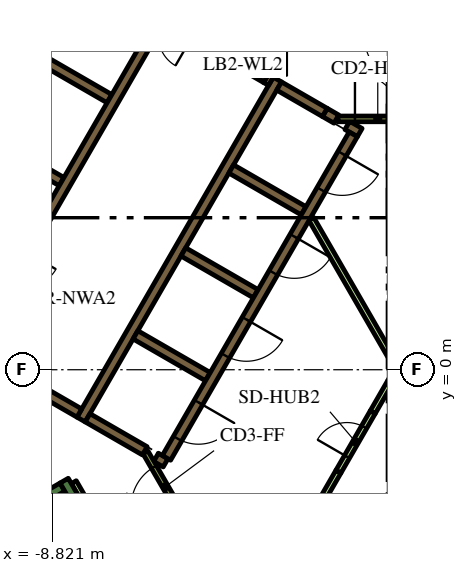
"""IFC4 building model, lengths in metres.
Left out: names, types, materials, properties, quantities, classifications, styles, units other than length and angle.
Written with IfcOpenShell. Run it as: python <this file> out.ifc"""

import sys

from ifc_helpers import new_model, si_unit, direction, frame, frame_2d, origin, place, context, subcontext, project, spatial, polyline, rectangle, outline, extrude, element, fill, save


model = new_model("IFC4")
c1 = context("Model", 3, precision=1e-05, world=origin(), true_north=direction((0.0, 1.0)))
c2 = subcontext(c1, "Body", "Model", "MODEL_VIEW")
j1 = project(units=[si_unit("LENGTHUNIT", "METRE"), si_unit("PLANEANGLEUNIT", "RADIAN")], contexts=[c1])
p1 = place(None, origin())
s1 = spatial("IfcSite", under=j1, at=p1, CompositionType="ELEMENT")
p2 = place(p1, origin())
s2 = spatial("IfcBuilding", under=s1, at=p2, CompositionType="ELEMENT")
p3 = place(p2, frame((0.0, 0.0, 118.8)))
s3 = spatial("IfcBuildingStorey", under=s2, at=p3, CompositionType="ELEMENT", Elevation=118.8)
p4 = place(p3, frame((-15.36, -1.503, 0.0), z_axis=(0.0, 0.0, 1.0), x_axis=(0.50000389221, 0.866023156604, 0.0)))
e1 = element("IfcWall", 1, at=p4, inside=s3, PredefinedType="SOLIDWALL", context=c2, shape_type="SweptSolid", body=[
    extrude(rectangle(XDim=21.0, YDim=0.9, at=frame_2d((10.5, 0.0))), origin(), (0.0, 0.0, 1.0), 3.9),
])
p5 = place(p3, frame((-14.44, -6.49, 0.0), z_axis=(0.0, 0.0, 1.0), x_axis=(0.866022966069, 0.500004222222, 0.0)))
e2 = element("IfcWall", 2, at=p5, inside=s3, PredefinedType="SOLIDWALL", context=c2, shape_type="SweptSolid", body=[
    extrude(rectangle(XDim=6.8, YDim=0.25, at=frame_2d((3.4, 0.0))), origin(), (0.0, 0.0, 1.0), 3.9),
])
p6 = place(p3, frame((-8.168, -3.503, 0.0), z_axis=(0.0, 0.0, 1.0), x_axis=(-0.499952099219, 0.866053057547, 0.0)))
e3 = element("IfcWall", 3, at=p6, inside=s3, PredefinedType="SOLIDWALL", context=c2, shape_type="SweptSolid", body=[
    extrude(rectangle(XDim=0.675, YDim=0.25, at=frame_2d((0.337, 0.0))), origin(), (0.0, 0.0, 1.0), 3.9),
])
p7 = place(p3, frame((-8.06, -1.311, 0.0), z_axis=(0.0, 0.0, 1.0), x_axis=(0.50000273126, 0.866023826885, 0.0)))
e4 = element("IfcWall", 4, at=p7, inside=s3, PredefinedType="SOLIDWALL", context=c2, shape_type="SweptSolid", body=[
    extrude(rectangle(XDim=10.33, YDim=0.25, at=frame_2d((5.165, 0.0))), origin(), (0.0, 0.0, 1.0), 3.9),
])
p8 = place(p3, frame((-1.342, 6.595, 0.0), z_axis=(0.0, 0.0, 1.0), x_axis=(-0.866046247233, 0.49996389635, 0.0)))
e5 = element("IfcWall", 5, at=p8, inside=s3, PredefinedType="SOLIDWALL", context=c2, shape_type="SweptSolid", body=[
    extrude(rectangle(XDim=0.35, YDim=0.25, at=frame_2d((0.175, 0.0))), origin(), (0.0, 0.0, 1.0), 3.9),
])
p9 = place(p3, frame((-1.647, 6.771, 0.0), z_axis=(0.0, 0.0, 1.0), x_axis=(-0.865971728693, 0.500092956464, 0.0)))
e6 = element("IfcWall", 6, at=p9, inside=s3, PredefinedType="SOLIDWALL", context=c2, shape_type="SweptSolid", body=[
    extrude(rectangle(XDim=1.388, YDim=0.25, at=frame_2d((0.694, 0.0))), origin(), (0.0, 0.0, 1.0), 3.9),
])
p10 = place(p3, frame((-0.728, 6.24, 0.0), z_axis=(0.0, 0.0, 1.0), x_axis=(-0.866088799389, 0.499890179513, 0.0)))
e7 = element("IfcWall", 7, at=p10, inside=s3, PredefinedType="SOLIDWALL", context=c2, shape_type="SweptSolid", body=[
    extrude(rectangle(XDim=0.378, YDim=0.25, at=frame_2d((0.189, 0.0))), origin(), (0.0, 0.0, 1.0), 3.9),
])
for number, where, z_axis, x_axis in (
    (8, (-2.204, 4.182, 0.0), (0.0, 0.0, 1.0), (-0.866, 0.5, 0.0)),
    (9, (-5.369, 3.1, 0.0), (0.0, 0.0, 1.0), (0.866, -0.5, 0.0)),
    (10, (-4.724, -0.182, 0.0), (0.0, 0.0, 1.0), (-0.866, 0.5, 0.0)),
):
    element("IfcWall", number, at=place(p3, frame(where, z_axis=z_axis, x_axis=x_axis)), inside=s3, PredefinedType="SOLIDWALL", context=c2, shape_type="SweptSolid", body=[
        extrude(rectangle(XDim=2.2, YDim=0.25, at=frame_2d((1.1, 0.0))), origin(), (0.0, 0.0, 1.0), 3.9),
    ])
p11 = place(p3, frame((-6.088, -2.305, 0.0), z_axis=(0.0, 0.0, 1.0), x_axis=(0.866059450854, -0.499941024108, 0.0)))
e11 = element("IfcWall", 11, at=p11, inside=s3, PredefinedType="SOLIDWALL", context=c2, shape_type="SweptSolid", body=[
    extrude(rectangle(XDim=0.29, YDim=0.25, at=frame_2d((0.145, 0.0))), origin(), (0.0, 0.0, 1.0), 3.9),
])
p12 = place(p3, frame((-7.889, -1.265, 0.0), z_axis=(0.0, 0.0, 1.0), x_axis=(0.865986741702, -0.500066958712, 0.0)))
e12 = element("IfcWall", 12, at=p12, inside=s3, PredefinedType="SOLIDWALL", context=c2, shape_type="SweptSolid", body=[
    extrude(rectangle(XDim=1.738, YDim=0.25, at=frame_2d((0.869, 0.0))), origin(), (0.0, 0.0, 1.0), 3.9),
])
p13 = place(p3, frame((-8.106, -1.14, 0.0), z_axis=(0.0, 0.0, 1.0), x_axis=(-0.866000643155, 0.500042884217, 0.0)))
e13 = element("IfcWall", 13, at=p13, inside=s3, PredefinedType="SOLIDWALL", context=c2, shape_type="SweptSolid", body=[
    extrude(rectangle(XDim=5.65, YDim=0.25, at=frame_2d((2.825, 0.0))), origin(), (0.0, 0.0, 1.0), 3.9),
])
p14 = place(p3, origin())
e14 = element("IfcWall", 14, at=p14, inside=s3, PredefinedType="SOLIDWALL", context=c2, shape_type="SweptSolid", body=[
    extrude(outline(polyline([(-3.128, 7.481), (-3.259, 7.557), (-3.134, 7.773), (-3.003, 7.698), (-3.128, 7.481)])), origin(), (0.0, 0.0, 1.0), 3.9),
])
for number, where, z_axis, x_axis in (
    (15, (-8.574, 4.95, 0.0), (0.0, 0.0, 1.0), (-0.866, 0.5, 0.0)),
    (16, (-7.314, 7.132, 0.0), (0.0, 0.0, 1.0), (-0.866, 0.5, 0.0)),
):
    element("IfcWall", number, at=place(p3, frame(where, z_axis=z_axis, x_axis=x_axis)), inside=s3, PredefinedType="SOLIDWALL", context=c2, shape_type="SweptSolid", body=[
        extrude(rectangle(XDim=2.2, YDim=0.25, at=frame_2d((1.1, 0.0))), origin(), (0.0, 0.0, 1.0), 3.9),
    ])
p15 = place(p3, frame((-4.409, 8.365, 0.0), z_axis=(0.0, 0.0, 1.0), x_axis=(-0.866057014183, 0.499945245186, 0.0)))
e17 = element("IfcWall", 17, at=p15, inside=s3, PredefinedType="SOLIDWALL", context=c2, shape_type="SweptSolid", body=[
    extrude(rectangle(XDim=0.379, YDim=0.25, at=frame_2d((0.19, 0.0))), origin(), (0.0, 0.0, 1.0), 3.9),
])
p16 = place(p3, frame((-1.887, -3.718, 0.0), z_axis=(0.0, 0.0, 1.0), x_axis=(0.500057179532, 0.865992388649, 0.0)))
e18 = element("IfcWall", 18, at=p16, inside=s3, PredefinedType="PARTITIONING", context=c2, shape_type="SweptSolid", body=[
    extrude(rectangle(XDim=1.199, YDim=0.15, at=frame_2d((0.6, 0.0))), origin(), (0.0, 0.0, 1.0), 2.75),
])
p17 = place(p3, frame((-8.252, -2.958, 0.0), z_axis=(0.0, 0.0, 1.0), x_axis=(0.500174715838, -0.865924508047, 0.0)))
e19 = element("IfcWall", 19, at=p17, inside=s3, PredefinedType="PARTITIONING", context=c2, shape_type="SweptSolid", body=[
    extrude(rectangle(XDim=0.514, YDim=0.15, at=frame_2d((0.257, 0.0))), origin(), (0.0, 0.0, 1.0), 2.75),
])
p18 = place(p3, frame((2.435, -3.718, 0.0), z_axis=(0.0, 0.0, 1.0), x_axis=(-0.499985176046, 0.866033962229, 0.0)))
e20 = element("IfcWall", 20, at=p18, inside=s3, PredefinedType="PARTITIONING", context=c2, shape_type="SweptSolid", body=[
    extrude(rectangle(XDim=8.875, YDim=0.15, at=frame_2d((4.438, 0.0))), origin(), (0.0, 0.0, 1.0), 2.75),
])
p19 = place(p3, frame((-0.387, -1.121, 0.0), z_axis=(0.0, 0.0, 1.0), x_axis=(0.500057179532, 0.865992388649, 0.0)))
e21 = element("IfcWall", 21, at=p19, inside=s3, PredefinedType="PARTITIONING", context=c2, shape_type="SweptSolid", body=[
    extrude(rectangle(XDim=1.199, YDim=0.15, at=frame_2d((0.6, 0.0))), origin(), (0.0, 0.0, 1.0), 2.75),
])
p20 = place(p3, frame((-6.008, 9.144, 0.0), z_axis=(0.0, 0.0, 1.0), x_axis=(-0.500006956611, -0.866021387346, 0.0)))
e22 = element("IfcWall", 22, at=p20, inside=s3, PredefinedType="SOLIDWALL", context=c2, shape_type="SweptSolid", body=[
    extrude(rectangle(XDim=9.83, YDim=0.25, at=frame_2d((4.915, 0.0))), origin(), (0.0, 0.0, 1.0), 3.9),
])
p21 = place(p20, frame((6.985, 0.0, 0.0)))
e23 = element("IfcOpeningElement", 23, at=p21, cuts=e22, PredefinedType="OPENING", context=c2, shape_type="SweptSolid", body=[
    extrude(rectangle(XDim=0.9, YDim=2.1, at=frame_2d((0.45, 1.05))), frame((0.0, 0.135, 0.0), z_axis=(0.0, -1.0, 0.0), x_axis=(1.0, 0.0, 0.0)), (0.0, 0.0, 1.0), 0.27),
])
p22 = place(p3, frame((-0.898, 6.194, 0.0), z_axis=(0.0, 0.0, 1.0), x_axis=(-0.499996202215, -0.866027596426, 0.0)))
e24 = element("IfcWall", 24, at=p22, inside=s3, PredefinedType="SOLIDWALL", context=c2, shape_type="SweptSolid", body=[
    extrude(rectangle(XDim=9.83, YDim=0.25, at=frame_2d((4.915, 0.0))), origin(), (0.0, 0.0, 1.0), 3.9),
])
p23 = place(p22, frame((0.585, 0.0, 0.0)))
e25 = element("IfcOpeningElement", 25, at=p23, cuts=e24, PredefinedType="OPENING", context=c2, shape_type="SweptSolid", body=[
    extrude(rectangle(XDim=1.1, YDim=2.1, at=frame_2d((0.55, 1.05))), frame((0.0, 0.135, 0.0), z_axis=(0.0, -1.0, 0.0), x_axis=(1.0, 0.0, 0.0)), (0.0, 0.0, 1.0), 0.27),
])
p24 = place(p22, frame((3.105, 0.0, 0.0)))
e26 = element("IfcOpeningElement", 26, at=p24, cuts=e24, PredefinedType="OPENING", context=c2, shape_type="SweptSolid", body=[
    extrude(rectangle(XDim=1.1, YDim=2.1, at=frame_2d((0.55, 1.05))), frame((0.0, 0.135, 0.0), z_axis=(0.0, -1.0, 0.0), x_axis=(1.0, 0.0, 0.0)), (0.0, 0.0, 1.0), 0.27),
])
p25 = place(p22, frame((5.625, 0.0, 0.0)))
e27 = element("IfcOpeningElement", 27, at=p25, cuts=e24, PredefinedType="OPENING", context=c2, shape_type="SweptSolid", body=[
    extrude(rectangle(XDim=1.1, YDim=2.1, at=frame_2d((0.55, 1.05))), frame((0.0, 0.135, 0.0), z_axis=(0.0, -1.0, 0.0), x_axis=(1.0, 0.0, 0.0)), (0.0, 0.0, 1.0), 0.27),
])
p26 = place(p22, frame((8.145, 0.0, 0.0)))
e28 = element("IfcOpeningElement", 28, at=p26, cuts=e24, PredefinedType="OPENING", context=c2, shape_type="SweptSolid", body=[
    extrude(rectangle(XDim=1.1, YDim=2.1, at=frame_2d((0.55, 1.05))), frame((0.0, 0.135, 0.0), z_axis=(0.0, -1.0, 0.0), x_axis=(1.0, 0.0, 0.0)), (0.0, 0.0, 1.0), 0.27),
])
p27 = place(p3, frame((-1.303, 6.6, 0.0), z_axis=(0.0, 0.0, 1.0), x_axis=(1.0, 0.0, 0.0)))
e29 = element("IfcWall", 29, at=p27, inside=s3, PredefinedType="PARTITIONING", context=c2, shape_type="SweptSolid", body=[
    extrude(rectangle(XDim=2.1, YDim=0.15, at=frame_2d((1.05, 0.0))), origin(), (0.0, 0.0, 1.0), 3.9),
])
p28 = place(p27, frame((0.45, 0.0, 0.0)))
e30 = element("IfcOpeningElement", 30, at=p28, cuts=e29, PredefinedType="OPENING", context=c2, shape_type="SweptSolid", body=[
    extrude(rectangle(XDim=1.2, YDim=2.1, at=frame_2d((0.6, 1.05))), frame((0.0, 0.085, 0.0), z_axis=(0.0, -1.0, 0.0), x_axis=(1.0, 0.0, 0.0)), (0.0, 0.0, 1.0), 0.17),
])
p29 = place(p3, frame((-5.317, -3.99, 0.0), z_axis=(0.0, 0.0, 1.0), x_axis=(-0.500027713859, 0.866009402589, 0.0)))
e31 = element("IfcWall", 31, at=p29, inside=s3, PredefinedType="PARTITIONING", context=c2, shape_type="SweptSolid", body=[
    extrude(rectangle(XDim=2.1, YDim=0.15, at=frame_2d((1.05, 0.0))), origin(), (0.0, 0.0, 1.0), 3.9),
])
p30 = place(p29, frame((0.45, 0.0, 0.0)))
e32 = element("IfcOpeningElement", 32, at=p30, cuts=e31, PredefinedType="OPENING", context=c2, shape_type="SweptSolid", body=[
    extrude(rectangle(XDim=1.2, YDim=2.1, at=frame_2d((0.6, 1.05))), frame((0.0, 0.085, 0.0), z_axis=(0.0, -1.0, 0.0), x_axis=(1.0, 0.0, 0.0)), (0.0, 0.0, 1.0), 0.17),
])
p31 = place(p3, frame((-4.409, 8.365, 0.0), z_axis=(0.0, 0.0, 1.0), x_axis=(0.866034573852, -0.49998411664, 0.0)))
e33 = element("IfcWall", 33, at=p31, inside=s3, PredefinedType="SOLIDWALL", context=c2, shape_type="SweptSolid", body=[
    extrude(rectangle(XDim=1.4, YDim=0.25, at=frame_2d((0.7, 0.0))), origin(), (0.0, 0.0, 1.0), 3.9),
])
p32 = place(p31, frame((0.1, 0.0, 0.0)))
e34 = element("IfcOpeningElement", 34, at=p32, cuts=e33, PredefinedType="OPENING", context=c2, shape_type="SweptSolid", body=[
    extrude(rectangle(XDim=1.2, YDim=2.1, at=frame_2d((0.6, 1.05))), frame((0.0, 0.135, 0.0), z_axis=(0.0, -1.0, 0.0), x_axis=(1.0, 0.0, 0.0)), (0.0, 0.0, 1.0), 0.27),
])
p33 = place(p3, frame((-1.287, -2.679, 0.0), z_axis=(0.0, 0.0, 1.0), x_axis=(0.499961193289, 0.866047807691, 0.0)))
e35 = element("IfcWall", 35, at=p33, inside=s3, PredefinedType="PARTITIONING", context=c2, shape_type="SweptSolid", body=[
    extrude(rectangle(XDim=1.8, YDim=0.15, at=frame_2d((0.9, 0.0))), origin(), (0.0, 0.0, 1.0), 2.75),
])
p34 = place(p33, frame((0.45, 0.0, 0.0)))
e36 = element("IfcOpeningElement", 36, at=p34, cuts=e35, PredefinedType="OPENING", context=c2, shape_type="SweptSolid", body=[
    extrude(rectangle(XDim=0.9, YDim=2.1, at=frame_2d((0.45, 1.05))), frame((0.0, 0.085, 0.0), z_axis=(0.0, -1.0, 0.0), x_axis=(1.0, 0.0, 0.0)), (0.0, 0.0, 1.0), 0.17),
])
p35 = place(p3, frame((-19.081, -3.9, 0.0), z_axis=(0.0, 0.0, 1.0), x_axis=(0.499998313975, 0.866026377209, 0.0)))
e37 = element("IfcWall", 37, at=p35, inside=s3, PredefinedType="PARTITIONING", context=c2, shape_type="SweptSolid", body=[
    extrude(rectangle(XDim=25.766, YDim=0.15, at=frame_2d((12.883, 0.0))), origin(), (0.0, 0.0, 1.0), 2.75),
])
p36 = place(p35, frame((19.306, 0.0, 0.0)))
e38 = element("IfcOpeningElement", 38, at=p36, cuts=e37, PredefinedType="OPENING", context=c2, shape_type="SweptSolid", body=[
    extrude(rectangle(XDim=1.0, YDim=2.1, at=frame_2d((0.5, 1.05))), frame((0.0, 0.085, 0.0), z_axis=(0.0, -1.0, 0.0), x_axis=(1.0, 0.0, 0.0)), (0.0, 0.0, 1.0), 0.17),
])
p37 = place(p35, frame((18.0, 0.0, 0.0)))
e39 = element("IfcOpeningElement", 39, at=p37, cuts=e37, PredefinedType="OPENING", context=c2, shape_type="SweptSolid", body=[
    extrude(rectangle(XDim=1.0, YDim=2.1, at=frame_2d((0.5, 1.05))), frame((0.0, 0.085, 0.0), z_axis=(0.0, -1.0, 0.0), x_axis=(1.0, 0.0, 0.0)), (0.0, 0.0, 1.0), 0.17),
])
p38 = place(p35, frame((7.793, 0.0, 0.0)))
e40 = element("IfcOpeningElement", 40, at=p38, cuts=e37, PredefinedType="OPENING", context=c2, shape_type="SweptSolid", body=[
    extrude(rectangle(XDim=0.9, YDim=2.1, at=frame_2d((0.45, 1.05))), frame((0.0, 0.085, 0.0), z_axis=(0.0, -1.0, 0.0), x_axis=(1.0, 0.0, 0.0)), (0.0, 0.0, 1.0), 0.17),
])
p39 = place(p35, frame((4.674, 0.0, 0.0)))
e41 = element("IfcOpeningElement", 41, at=p39, cuts=e37, PredefinedType="OPENING", context=c2, shape_type="SweptSolid", body=[
    extrude(rectangle(XDim=0.9, YDim=2.1, at=frame_2d((0.45, 1.05))), frame((0.0, 0.085, 0.0), z_axis=(0.0, -1.0, 0.0), x_axis=(1.0, 0.0, 0.0)), (0.0, 0.0, 1.0), 0.17),
])
p40 = place(p35, frame((0.18, 0.0, 0.0)))
e42 = element("IfcOpeningElement", 42, at=p40, cuts=e37, PredefinedType="OPENING", context=c2, shape_type="SweptSolid", body=[
    extrude(rectangle(XDim=1.0, YDim=2.1, at=frame_2d((0.5, 1.05))), frame((0.0, 0.085, 0.0), z_axis=(0.0, -1.0, 0.0), x_axis=(1.0, 0.0, 0.0)), (0.0, 0.0, 1.0), 0.17),
])
p41 = place(p23, origin())
e43 = element("IfcDoor", 43, at=p41, inside=s3, OperationType="DOUBLE_DOOR_SLIDING", PredefinedType="DOOR", context=c2, shape_type="SweptSolid", body=[
    extrude(rectangle(XDim=1.1, YDim=2.1, at=frame_2d((0.55, 1.05))), frame((0.0, 0.025, 0.0), z_axis=(0.0, -1.0, 0.0), x_axis=(1.0, 0.0, 0.0)), (0.0, 0.0, 1.0), 0.05),
])
fill(e25, e43)
p42 = place(p24, origin())
e44 = element("IfcDoor", 44, at=p42, inside=s3, OperationType="DOUBLE_DOOR_SLIDING", PredefinedType="DOOR", context=c2, shape_type="SweptSolid", body=[
    extrude(rectangle(XDim=1.1, YDim=2.1, at=frame_2d((0.55, 1.05))), frame((0.0, 0.025, 0.0), z_axis=(0.0, -1.0, 0.0), x_axis=(1.0, 0.0, 0.0)), (0.0, 0.0, 1.0), 0.05),
])
fill(e26, e44)
p43 = place(p25, origin())
e45 = element("IfcDoor", 45, at=p43, inside=s3, OperationType="DOUBLE_DOOR_SLIDING", PredefinedType="DOOR", context=c2, shape_type="SweptSolid", body=[
    extrude(rectangle(XDim=1.1, YDim=2.1, at=frame_2d((0.55, 1.05))), frame((0.0, 0.025, 0.0), z_axis=(0.0, -1.0, 0.0), x_axis=(1.0, 0.0, 0.0)), (0.0, 0.0, 1.0), 0.05),
])
fill(e27, e45)
p44 = place(p26, origin())
e46 = element("IfcDoor", 46, at=p44, inside=s3, OperationType="DOUBLE_DOOR_SLIDING", PredefinedType="DOOR", context=c2, shape_type="SweptSolid", body=[
    extrude(rectangle(XDim=1.1, YDim=2.1, at=frame_2d((0.55, 1.05))), frame((0.0, 0.025, 0.0), z_axis=(0.0, -1.0, 0.0), x_axis=(1.0, 0.0, 0.0)), (0.0, 0.0, 1.0), 0.05),
])
fill(e28, e46)
p45 = place(p28, origin())
e47 = element("IfcDoor", 47, at=p45, inside=s3, OperationType="SINGLE_SWING_LEFT", PredefinedType="DOOR", context=c2, shape_type="SweptSolid", body=[
    extrude(rectangle(XDim=1.2, YDim=2.1, at=frame_2d((0.6, 1.05))), frame((0.0, 0.025, 0.0), z_axis=(0.0, -1.0, 0.0), x_axis=(1.0, 0.0, 0.0)), (0.0, 0.0, 1.0), 0.05),
])
fill(e30, e47)
p46 = place(p30, origin())
e48 = element("IfcDoor", 48, at=p46, inside=s3, OperationType="SINGLE_SWING_LEFT", PredefinedType="DOOR", context=c2, shape_type="SweptSolid", body=[
    extrude(rectangle(XDim=1.2, YDim=2.1, at=frame_2d((0.6, 1.05))), frame((0.0, 0.025, 0.0), z_axis=(0.0, -1.0, 0.0), x_axis=(1.0, 0.0, 0.0)), (0.0, 0.0, 1.0), 0.05),
])
fill(e32, e48)
p47 = place(p32, origin())
e49 = element("IfcDoor", 49, at=p47, inside=s3, OperationType="SINGLE_SWING_LEFT", PredefinedType="DOOR", context=c2, shape_type="SweptSolid", body=[
    extrude(rectangle(XDim=1.2, YDim=2.1, at=frame_2d((0.6, 1.05))), frame((0.0, 0.025, 0.0), z_axis=(0.0, -1.0, 0.0), x_axis=(1.0, 0.0, 0.0)), (0.0, 0.0, 1.0), 0.05),
])
fill(e34, e49)
p48 = place(p34, origin())
e50 = element("IfcDoor", 50, at=p48, inside=s3, OperationType="SINGLE_SWING_LEFT", PredefinedType="DOOR", context=c2, shape_type="SweptSolid", body=[
    extrude(rectangle(XDim=0.9, YDim=2.1, at=frame_2d((0.45, 1.05))), frame((0.0, 0.025, 0.0), z_axis=(0.0, -1.0, 0.0), x_axis=(1.0, 0.0, 0.0)), (0.0, 0.0, 1.0), 0.05),
])
fill(e36, e50)
save(model, sys.argv[1])
